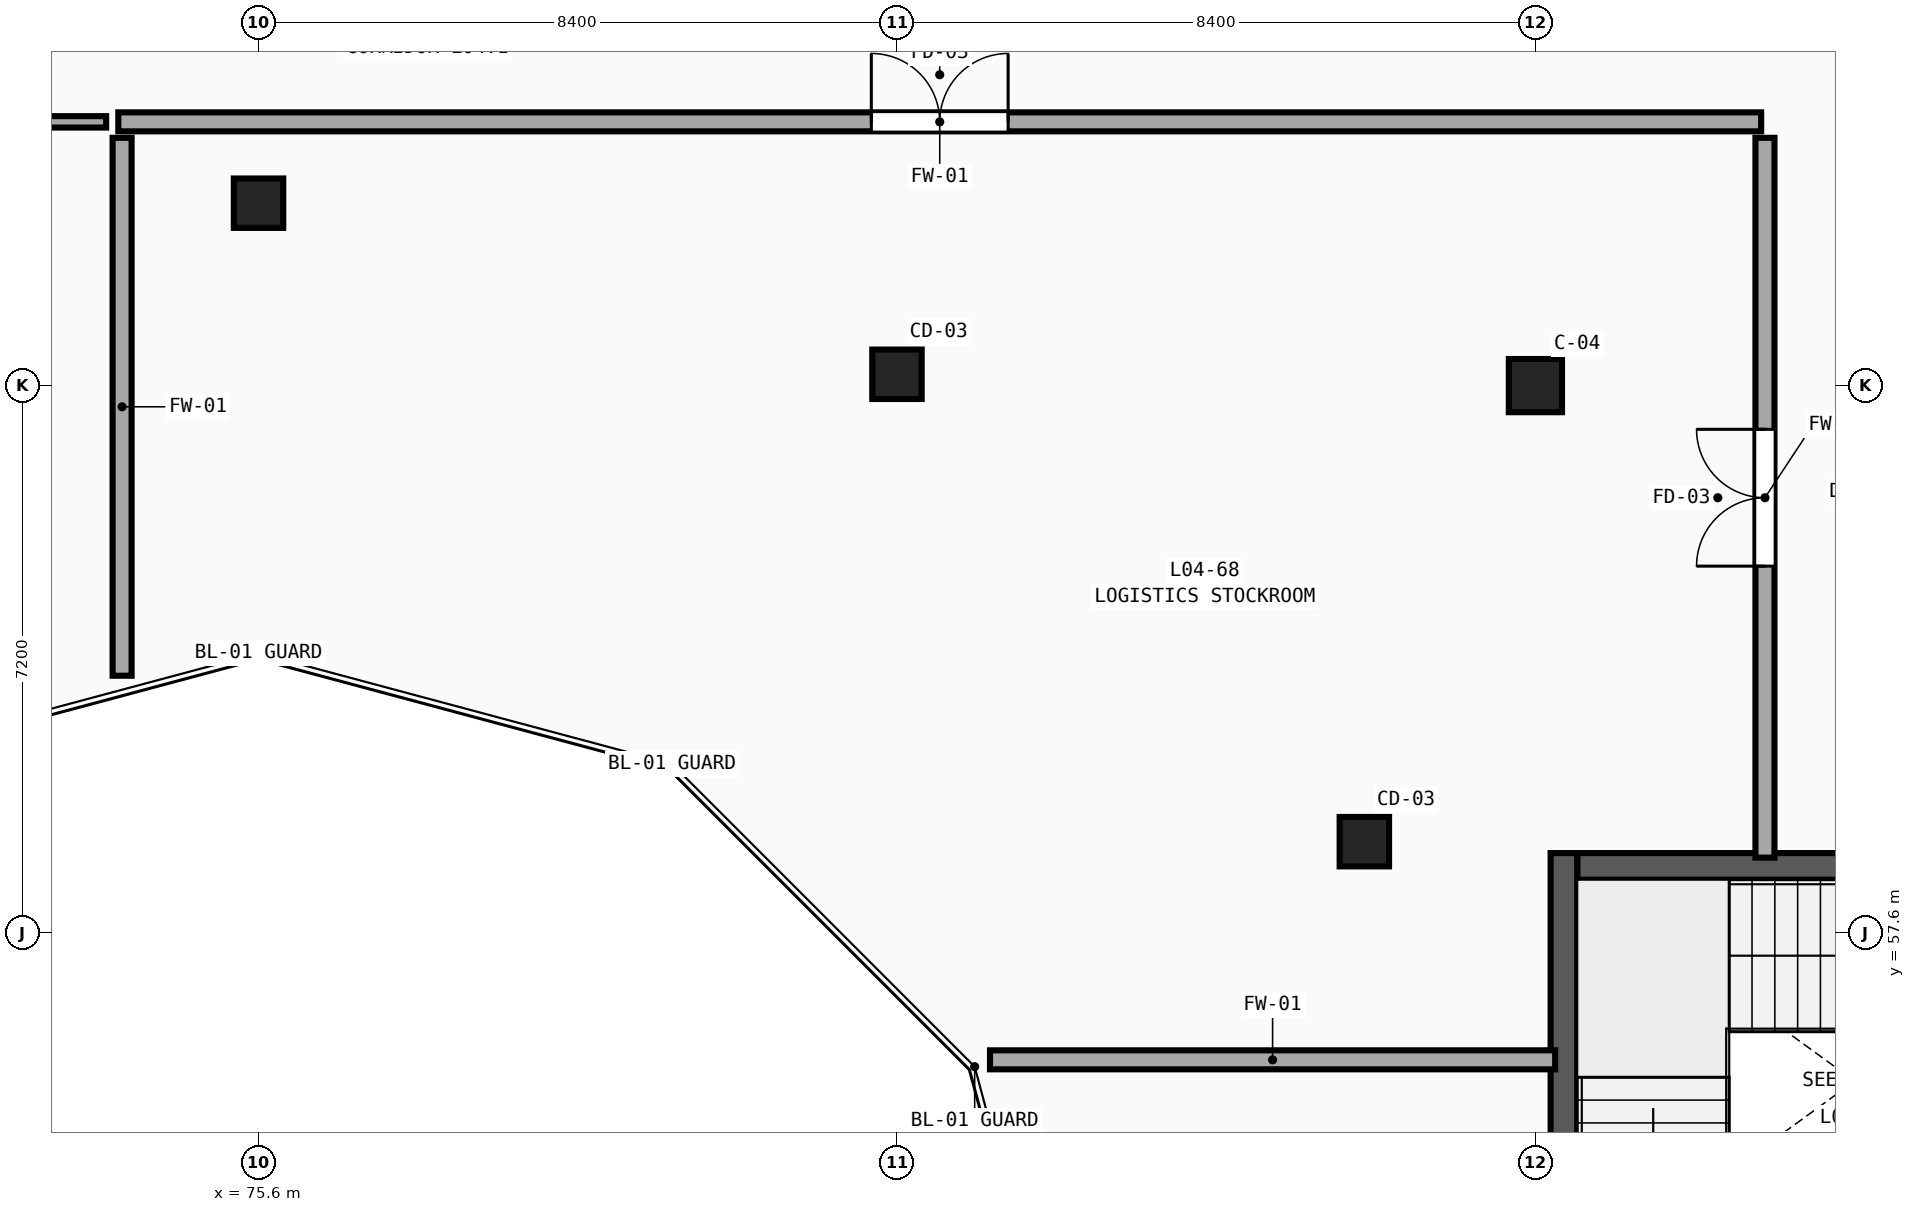
"""IFC4 building model, lengths in metres.
Left out: names, types, materials, properties, quantities, classifications, styles, units other than length and angle.
Written with IfcOpenShell. Run it as: python <this file> out.ifc"""

import sys

from ifc_helpers import new_model, si_unit, direction, frame, frame_2d, origin, origin_2d, place, context, subcontext, project, spatial, rectangle, circle, extrude, element, fill, save


model = new_model("IFC4")
c1 = context("Model", 3, precision=1e-05, world=origin(), true_north=direction((0.0, 1.0)))
c2 = subcontext(c1, "Body", "Model", "MODEL_VIEW")
j1 = project(units=[si_unit("LENGTHUNIT", "METRE"), si_unit("PLANEANGLEUNIT", "RADIAN")], contexts=[c1])
p1 = place(None, origin())
s1 = spatial("IfcSite", under=j1, at=p1, CompositionType="ELEMENT")
p2 = place(p1, origin())
s2 = spatial("IfcBuilding", under=s1, at=p2, CompositionType="ELEMENT")
p3 = place(p2, frame((0.0, 0.0, 18.9)))
s3 = spatial("IfcBuildingStorey", under=s2, at=p3, CompositionType="ELEMENT", Elevation=18.9)
p4 = place(p3, frame((92.4, 64.8, 0.0), z_axis=(0.0, 0.0, 1.0), x_axis=(1.0, 0.0, 0.0)))
e1 = element("IfcColumn", 1, at=p4, inside=s3, PredefinedType="COLUMN", context=c2, shape_type="SweptSolid", body=[
    extrude(rectangle(XDim=0.7, YDim=0.7, at=origin_2d()), origin(), (0.0, 0.0, 1.0), 4.5),
])
for number, where, z_axis, x_axis in (
    (2, (90.149, 58.8, 0.0), (0.0, 0.0, 1.0), (1.0, 0.0, 0.0)),
    (3, (84.0, 64.949, 0.0), (0.0, 0.0, 1.0), (1.0, 0.0, 0.0)),
    (4, (75.6, 67.2, 0.0), (0.0, 0.0, 1.0), (1.0, 0.0, 0.0)),
):
    element("IfcColumn", number, at=place(p3, frame(where, z_axis=z_axis, x_axis=x_axis)), inside=s3, PredefinedType="COLUMN", context=c2, shape_type="SweptSolid", body=[
        extrude(circle(Radius=0.325, at=origin_2d()), origin(), (0.0, 0.0, 1.0), 4.5),
    ])
p5 = place(p3, frame((92.95, 58.475, 0.0), z_axis=(0.0, 0.0, 1.0), x_axis=(1.0, 0.0, 0.0)))
e5 = element("IfcWall", 5, at=p5, inside=s3, PredefinedType="SHEAR", context=c2, shape_type="SweptSolid", body=[
    extrude(rectangle(XDim=7.3, YDim=0.35, at=frame_2d((3.65, 0.0))), origin(), (0.0, 0.0, 1.0), 4.5),
])
p6 = place(p3, frame((92.775, 58.65, 0.0), z_axis=(0.0, 0.0, 1.0), x_axis=(0.0, -1.0, 0.0)))
e6 = element("IfcWall", 6, at=p6, inside=s3, PredefinedType="SHEAR", context=c2, shape_type="SweptSolid", body=[
    extrude(rectangle(XDim=8.15, YDim=0.35, at=frame_2d((4.075, 0.0))), origin(), (0.0, 0.0, 1.0), 4.5),
])
p7 = place(p3, frame((73.755, 68.27, 0.0), z_axis=(0.0, 0.0, 1.0), x_axis=(1.0, 0.0, 0.0)))
e7 = element("IfcWall", 7, at=p7, inside=s3, PredefinedType="SOLIDWALL", context=c2, shape_type="SweptSolid", body=[
    extrude(rectangle(XDim=21.615, YDim=0.25, at=frame_2d((10.808, 0.0))), origin(), (0.0, 0.0, 1.0), 4.18),
])
p8 = place(p7, frame((9.907, 0.0, 0.0)))
e8 = element("IfcOpeningElement", 8, at=p8, cuts=e7, PredefinedType="OPENING", context=c2, shape_type="SweptSolid", body=[
    extrude(rectangle(XDim=1.8, YDim=2.3, at=frame_2d((0.9, 1.15))), frame((0.0, 0.145, 0.0), z_axis=(0.0, -1.0, 0.0), x_axis=(1.0, 0.0, 0.0)), (0.0, 0.0, 1.0), 0.29),
])
p9 = place(p3, frame((55.84, 68.27, 0.0), z_axis=(0.0, 0.0, 1.0), x_axis=(1.0, 0.0, 0.0)))
e9 = element("IfcWall", 9, at=p9, inside=s3, PredefinedType="PARTITIONING", context=c2, shape_type="SweptSolid", body=[
    extrude(rectangle(XDim=17.755, YDim=0.15, at=frame_2d((8.877, 0.0))), origin(), (0.0, 0.0, 1.0), 4.18),
])
p10 = place(p9, frame((8.117, 0.0, 0.0)))
e10 = element("IfcOpeningElement", 10, at=p10, cuts=e9, PredefinedType="OPENING", context=c2, shape_type="SweptSolid", body=[
    extrude(rectangle(XDim=1.52, YDim=2.45, at=frame_2d((0.76, 1.225))), frame((0.0, 0.095, 0.0), z_axis=(0.0, -1.0, 0.0), x_axis=(1.0, 0.0, 0.0)), (0.0, 0.0, 1.0), 0.19),
])
p11 = place(p3, frame((95.42, 58.59, 0.0), z_axis=(0.0, 0.0, 1.0), x_axis=(0.0, 1.0, 0.0)))
e11 = element("IfcWall", 11, at=p11, inside=s3, PredefinedType="SOLIDWALL", context=c2, shape_type="SweptSolid", body=[
    extrude(rectangle(XDim=9.47, YDim=0.25, at=frame_2d((4.735, 0.0))), origin(), (0.0, 0.0, 1.0), 4.18),
])
p12 = place(p11, frame((3.835, 0.0, 0.0)))
e12 = element("IfcOpeningElement", 12, at=p12, cuts=e11, PredefinedType="OPENING", context=c2, shape_type="SweptSolid", body=[
    extrude(rectangle(XDim=1.8, YDim=2.3, at=frame_2d((0.9, 1.15))), frame((0.0, 0.145, 0.0), z_axis=(0.0, -1.0, 0.0), x_axis=(1.0, 0.0, 0.0)), (0.0, 0.0, 1.0), 0.29),
])
p13 = place(p3, frame((85.224, 55.93, 0.0), z_axis=(0.0, 0.0, 1.0), x_axis=(1.0, 0.0, 0.0)))
e13 = element("IfcWall", 13, at=p13, inside=s3, PredefinedType="SOLIDWALL", context=c2, shape_type="SweptSolid", body=[
    extrude(rectangle(XDim=7.436, YDim=0.25, at=frame_2d((3.718, 0.0))), origin(), (0.0, 0.0, 1.0), 4.18),
])
p14 = place(p3, frame((73.805, 60.983, 0.0), z_axis=(0.0, 0.0, 1.0), x_axis=(0.0, 1.0, 0.0)))
e14 = element("IfcWall", 14, at=p14, inside=s3, PredefinedType="SOLIDWALL", context=c2, shape_type="SweptSolid", body=[
    extrude(rectangle(XDim=7.077, YDim=0.25, at=frame_2d((3.539, 0.0))), origin(), (0.0, 0.0, 1.0), 4.18),
])
p15 = place(p8, origin())
e15 = element("IfcDoor", 15, at=p15, inside=s3, OperationType="DOUBLE_DOOR_SINGLE_SWING", PredefinedType="DOOR", context=c2, shape_type="SweptSolid", body=[
    extrude(rectangle(XDim=1.8, YDim=2.3, at=frame_2d((0.9, 1.15))), frame((0.0, 0.025, 0.0), z_axis=(0.0, -1.0, 0.0), x_axis=(1.0, 0.0, 0.0)), (0.0, 0.0, 1.0), 0.05),
])
fill(e8, e15)
p16 = place(p12, origin())
e16 = element("IfcDoor", 16, at=p16, inside=s3, OperationType="DOUBLE_DOOR_SINGLE_SWING", PredefinedType="DOOR", context=c2, shape_type="SweptSolid", body=[
    extrude(rectangle(XDim=1.8, YDim=2.3, at=frame_2d((0.9, 1.15))), frame((0.0, 0.025, 0.0), z_axis=(0.0, -1.0, 0.0), x_axis=(1.0, 0.0, 0.0)), (0.0, 0.0, 1.0), 0.05),
])
fill(e12, e16)
save(model, sys.argv[1])
